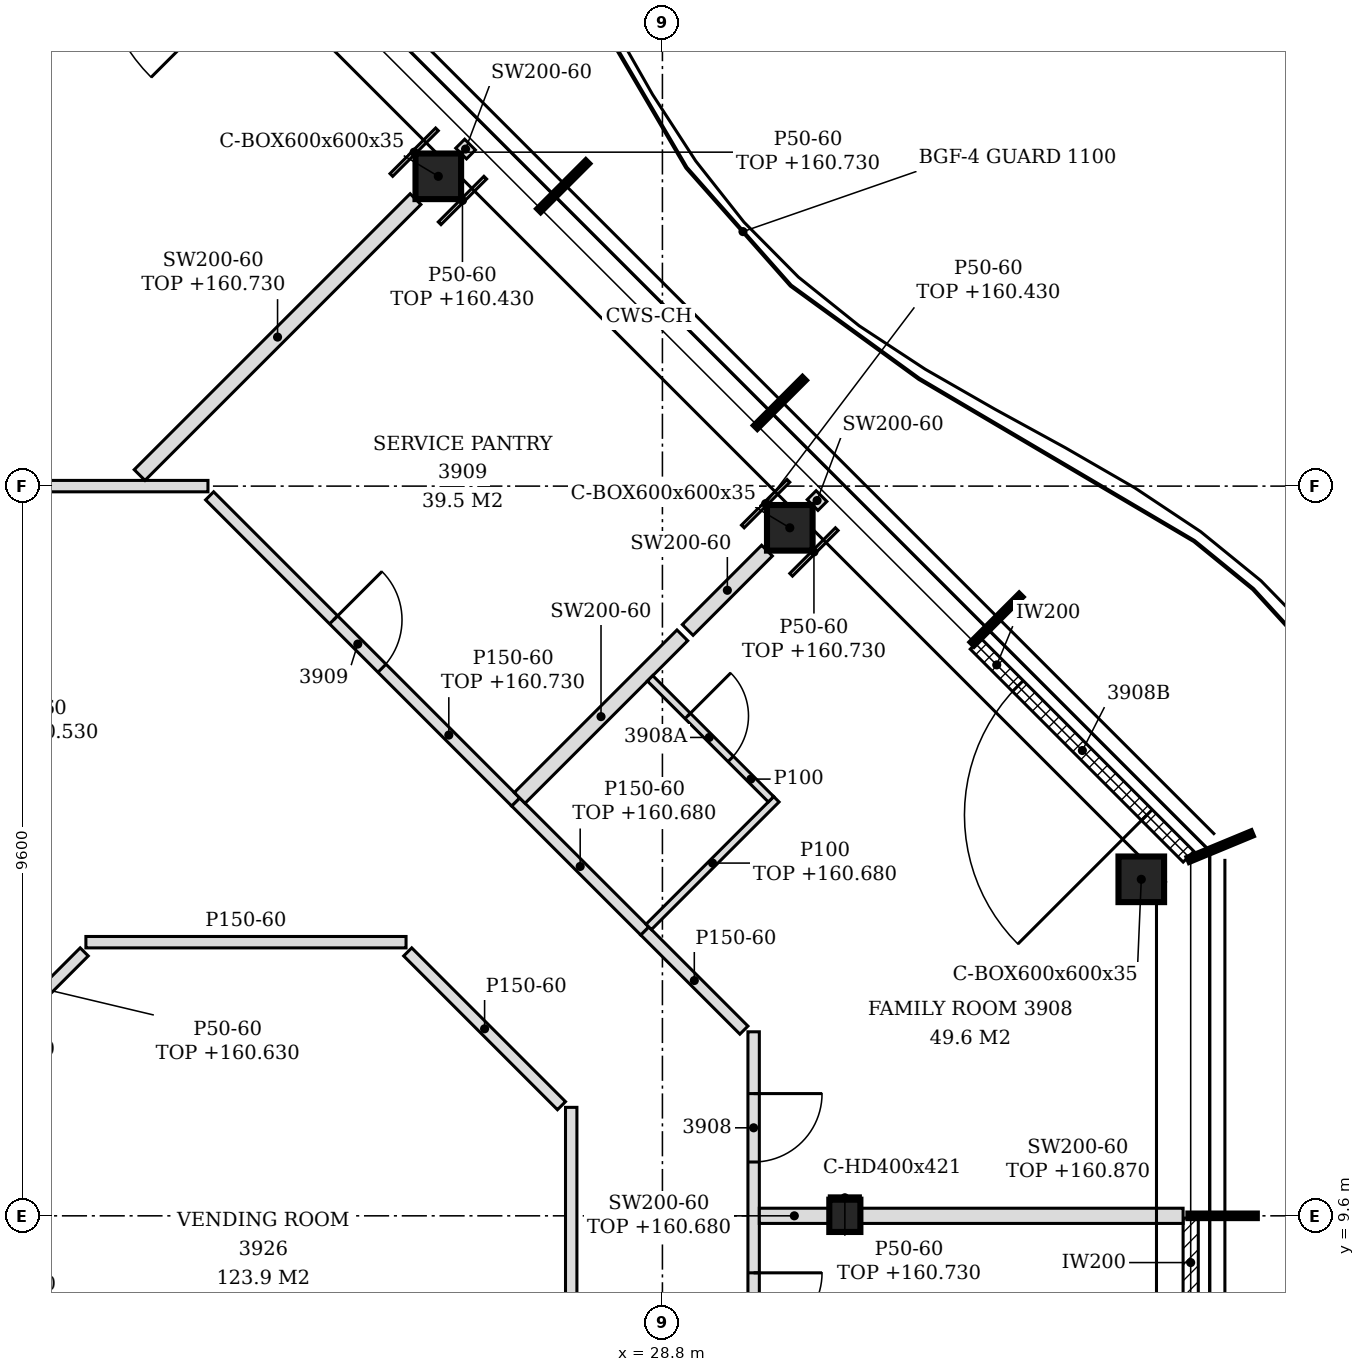
"""IFC4 building model, lengths in metres.
Left out: names, types, materials, properties, quantities, classifications, styles, units other than length and angle.
Written with IfcOpenShell. Run it as: python <this file> out.ifc"""

import sys

from ifc_helpers import new_model, si_unit, direction, frame, frame_2d, origin, origin_2d, place, context, subcontext, project, spatial, polyline, rectangle, hollow_rectangle, i_section, outline, extrude, element, fill, save


model = new_model("IFC4")
c1 = context("Model", 3, precision=1e-05, world=origin(), true_north=direction((0.0, 1.0)))
c2 = subcontext(c1, "Body", "Model", "MODEL_VIEW")
j1 = project(units=[si_unit("LENGTHUNIT", "METRE"), si_unit("PLANEANGLEUNIT", "RADIAN")], contexts=[c1])
p1 = place(None, origin())
s1 = spatial("IfcSite", under=j1, at=p1, CompositionType="ELEMENT")
p2 = place(p1, origin())
s2 = spatial("IfcBuilding", under=s1, at=p2, CompositionType="ELEMENT")
p3 = place(p2, frame((0.0, 0.0, 157.8)))
s3 = spatial("IfcBuildingStorey", under=s2, at=p3, CompositionType="ELEMENT", Elevation=157.8)
for number, where, z_axis, x_axis in (
    (1, (35.1, 14.027, -0.15), (0.0, 0.0, 1.0), (1.0, 0.0, 0.0)),
    (2, (30.476, 18.652, -0.15), (0.0, 0.0, 1.0), (1.0, 0.0, 0.0)),
    (3, (25.852, 23.276, -0.15), (0.0, 0.0, 1.0), (1.0, 0.0, 0.0)),
):
    element("IfcColumn", number, at=place(p3, frame(where, z_axis=z_axis, x_axis=x_axis)), inside=s3, PredefinedType="COLUMN", context=c2, shape_type="SweptSolid", body=[
        extrude(hollow_rectangle(XDim=0.6, YDim=0.6, WallThickness=0.035, at=origin_2d()), origin(), (0.0, 0.0, 1.0), 3.6),
    ])
p4 = place(p3, frame((31.2, 9.6, -0.15), z_axis=(0.0, 0.0, 1.0), x_axis=(1.0, 0.0, 0.0)))
e4 = element("IfcColumn", 4, at=p4, inside=s3, PredefinedType="COLUMN", context=c2, shape_type="SweptSolid", body=[
    extrude(i_section(OverallWidth=0.409, OverallDepth=0.425, WebThickness=0.033, FlangeThickness=0.052, FilletRadius=0.015, at=origin_2d()), origin(), (0.0, 0.0, 1.0), 3.6),
])
p5 = place(p3, frame((35.75, 4.83, 0.0), z_axis=(0.0, 0.0, 1.0), x_axis=(0.0, 1.0, 0.0)))
e5 = element("IfcWall", 5, at=p5, inside=s3, PredefinedType="NOTDEFINED", context=c2, shape_type="SweptSolid", body=[
    extrude(rectangle(XDim=4.74, YDim=0.2, at=frame_2d((2.37, 0.0))), origin(), (0.0, 0.0, 1.0), 3.45),
])
p6 = place(p5, frame((1.17, 0.0, 0.0)))
e6 = element("IfcOpeningElement", 6, at=p6, cuts=e5, PredefinedType="OPENING", context=c2, shape_type="SweptSolid", body=[
    extrude(rectangle(XDim=2.4, YDim=2.4, at=frame_2d((1.2, 1.2))), frame((0.0, 0.11, 0.0), z_axis=(0.0, -1.0, 0.0), x_axis=(1.0, 0.0, 0.0)), (0.0, 0.0, 1.0), 0.22),
])
p7 = place(p3, frame((35.722, 14.325, 0.0), z_axis=(0.0, 0.0, 1.0), x_axis=(-0.707106781187, 0.707106781187, 0.0)))
e7 = element("IfcWall", 7, at=p7, inside=s3, PredefinedType="NOTDEFINED", context=c2, shape_type="SweptSolid", body=[
    extrude(rectangle(XDim=3.962, YDim=0.2, at=frame_2d((1.981, 0.0))), origin(), (0.0, 0.0, 1.0), 3.45),
])
p8 = place(p7, frame((0.775, 0.0, 0.0)))
e8 = element("IfcOpeningElement", 8, at=p8, cuts=e7, PredefinedType="OPENING", context=c2, shape_type="SweptSolid", body=[
    extrude(rectangle(XDim=2.4, YDim=2.4, at=frame_2d((1.2, 1.2))), frame((0.0, 0.11, 0.0), z_axis=(0.0, -1.0, 0.0), x_axis=(1.0, 0.0, 0.0)), (0.0, 0.0, 1.0), 0.22),
])
p9 = place(p3, frame((30.0, -0.813, 0.0), z_axis=(0.0, 0.0, 1.0), x_axis=(0.0, 1.0, 0.0)))
e9 = element("IfcWall", 9, at=p9, inside=s3, PredefinedType="PARTITIONING", context=c2, shape_type="SweptSolid", body=[
    extrude(outline(polyline([(0.0, 0.0), (12.834, 0.0), (12.834, 3.45), (10.518, 3.45), (10.516, 2.88), (10.308, 2.88), (10.306, 3.45), (5.718, 3.45), (5.716, 2.88), (5.508, 2.88), (5.506, 3.45), (0.918, 3.45), (0.916, 2.88), (0.708, 2.88), (0.706, 3.45), (0.0, 3.45), (0.0, 0.0)])), frame((0.0, 0.075, 0.0), z_axis=(0.0, -1.0, 0.0), x_axis=(1.0, 0.0, 0.0)), (0.0, 0.0, 1.0), 0.15),
])
p10 = place(p9, frame((1.563, 0.0, 0.0)))
e10 = element("IfcOpeningElement", 10, at=p10, cuts=e9, PredefinedType="OPENING", context=c2, shape_type="SweptSolid", body=[
    extrude(rectangle(XDim=0.9, YDim=2.1, at=frame_2d((0.45, 1.05))), frame((0.0, 0.085, 0.0), z_axis=(0.0, -1.0, 0.0), x_axis=(1.0, 0.0, 0.0)), (0.0, 0.0, 1.0), 0.17),
])
p11 = place(p9, frame((8.763, 0.0, 0.0)))
e11 = element("IfcOpeningElement", 11, at=p11, cuts=e9, PredefinedType="OPENING", context=c2, shape_type="SweptSolid", body=[
    extrude(rectangle(XDim=0.9, YDim=2.1, at=frame_2d((0.45, 1.05))), frame((0.0, 0.085, 0.0), z_axis=(0.0, -1.0, 0.0), x_axis=(1.0, 0.0, 0.0)), (0.0, 0.0, 1.0), 0.17),
])
p12 = place(p9, frame((11.121, 0.0, 0.0)))
e12 = element("IfcOpeningElement", 12, at=p12, cuts=e9, PredefinedType="OPENING", context=c2, shape_type="SweptSolid", body=[
    extrude(rectangle(XDim=0.9, YDim=2.1, at=frame_2d((0.45, 1.05))), frame((0.0, 0.085, 0.0), z_axis=(0.0, -1.0, 0.0), x_axis=(1.0, 0.0, 0.0)), (0.0, 0.0, 1.0), 0.17),
])
p13 = place(p3, frame((27.6, 0.1, 0.0), z_axis=(0.0, 0.0, 1.0), x_axis=(0.0, 1.0, 0.0)))
e13 = element("IfcWall", 13, at=p13, inside=s3, PredefinedType="PARTITIONING", context=c2, shape_type="SweptSolid", body=[
    extrude(outline(polyline([(0.0, 0.0), (10.927, 0.0), (10.927, 3.45), (9.605, 3.45), (9.603, 2.88), (9.395, 2.88), (9.393, 3.45), (4.805, 3.45), (4.803, 2.88), (4.595, 2.88), (4.593, 3.45), (0.005, 3.45), (0.003, 2.88), (0.0, 2.88), (0.0, 0.0)])), frame((0.0, 0.075, 0.0), z_axis=(0.0, -1.0, 0.0), x_axis=(1.0, 0.0, 0.0)), (0.0, 0.0, 1.0), 0.15),
])
p14 = place(p13, frame((1.0, 0.0, 0.0)))
e14 = element("IfcOpeningElement", 14, at=p14, cuts=e13, PredefinedType="OPENING", context=c2, shape_type="SweptSolid", body=[
    extrude(rectangle(XDim=0.8, YDim=2.1, at=frame_2d((0.4, 1.05))), frame((0.0, 0.085, 0.0), z_axis=(0.0, -1.0, 0.0), x_axis=(1.0, 0.0, 0.0)), (0.0, 0.0, 1.0), 0.17),
])
p15 = place(p13, frame((3.55, 0.0, 0.0)))
e15 = element("IfcOpeningElement", 15, at=p15, cuts=e13, PredefinedType="OPENING", context=c2, shape_type="SweptSolid", body=[
    extrude(rectangle(XDim=0.8, YDim=2.1, at=frame_2d((0.4, 1.05))), frame((0.0, 0.085, 0.0), z_axis=(0.0, -1.0, 0.0), x_axis=(1.0, 0.0, 0.0)), (0.0, 0.0, 1.0), 0.17),
])
p16 = place(p3, frame((30.075, 9.6, 0.0), z_axis=(0.0, 0.0, 1.0), x_axis=(1.0, 0.0, 0.0)))
e16 = element("IfcWall", 16, at=p16, inside=s3, PredefinedType="PARTITIONING", context=c2, shape_type="SweptSolid", body=[
    extrude(rectangle(XDim=0.921, YDim=0.2, at=frame_2d((0.46, 0.0))), origin(), (0.0, 0.0, 1.0), 2.88),
])
p17 = place(p3, frame((31.405, 9.6, 0.0), z_axis=(0.0, 0.0, 1.0), x_axis=(1.0, 0.0, 0.0)))
e17 = element("IfcWall", 17, at=p17, inside=s3, PredefinedType="PARTITIONING", context=c2, shape_type="SweptSolid", body=[
    extrude(outline(polyline([(0.0, 0.0), (4.245, 0.0), (4.246, 3.07), (3.845, 3.07), (3.844, 2.93), (3.545, 2.93), (3.543, 3.07), (0.0, 3.07), (0.0, 0.0)])), frame((0.0, 0.1, 0.0), z_axis=(0.0, -1.0, 0.0), x_axis=(1.0, 0.0, 0.0)), (0.0, 0.0, 1.0), 0.2),
])
p18 = place(p3, frame((27.472, 11.049, 0.0), z_axis=(0.0, 0.0, 1.0), x_axis=(-0.707106781187, 0.707106781187, 0.0)))
e18 = element("IfcWall", 18, at=p18, inside=s3, PredefinedType="PARTITIONING", context=c2, shape_type="SweptSolid", body=[
    extrude(rectangle(XDim=2.861, YDim=0.15, at=frame_2d((1.43, 0.0))), origin(), (0.0, 0.0, 1.0), 3.45),
])
p19 = place(p3, frame((29.872, 12.043, 0.0), z_axis=(0.0, 0.0, 1.0), x_axis=(-0.707172918471, 0.707040637716, 0.0)))
e19 = element("IfcWall", 19, at=p19, inside=s3, PredefinedType="PARTITIONING", context=c2, shape_type="SweptSolid", body=[
    extrude(rectangle(XDim=1.846, YDim=0.15, at=frame_2d((0.923, 0.0))), origin(), (0.0, 0.0, 1.0), 3.45),
])
p20 = place(p3, frame((20.208, 12.086, 0.0), z_axis=(0.0, 0.0, 1.0), x_axis=(0.706756381459, 0.707457007363, 0.0)))
e20 = element("IfcWall", 20, at=p20, inside=s3, PredefinedType="PARTITIONING", context=c2, shape_type="SweptSolid", body=[
    extrude(rectangle(XDim=1.394, YDim=0.15, at=frame_2d((0.697, 0.0))), origin(), (0.0, 0.0, 1.0), 3.45),
])
p21 = place(p3, frame((21.215, 13.2, 0.0), z_axis=(0.0, 0.0, 1.0), x_axis=(1.0, 0.0, 0.0)))
e21 = element("IfcWall", 21, at=p21, inside=s3, PredefinedType="PARTITIONING", context=c2, shape_type="SweptSolid", body=[
    extrude(rectangle(XDim=4.212, YDim=0.15, at=frame_2d((2.106, 0.0))), origin(), (0.0, 0.0, 1.0), 3.45),
])
p22 = place(p3, frame((28.567, 13.348, 0.0), z_axis=(0.0, 0.0, 1.0), x_axis=(-0.707310148094, 0.706903355773, 0.0)))
e22 = element("IfcWall", 22, at=p22, inside=s3, PredefinedType="PARTITIONING", context=c2, shape_type="SweptSolid", body=[
    extrude(rectangle(XDim=2.401, YDim=0.15, at=frame_2d((1.2, 0.0))), origin(), (0.0, 0.0, 1.0), 2.88),
])
p23 = place(p3, frame((28.62, 13.401, 0.0), z_axis=(0.0, 0.0, 1.0), x_axis=(0.707055379538, 0.707158179099, 0.0)))
e23 = element("IfcWall", 23, at=p23, inside=s3, PredefinedType="PARTITIONING", context=c2, shape_type="SweptSolid", body=[
    extrude(rectangle(XDim=2.375, YDim=0.1, at=frame_2d((1.188, 0.0))), origin(), (0.0, 0.0, 1.0), 2.88),
])
p24 = place(p3, frame((26.869, 15.045, 0.0), z_axis=(0.0, 0.0, 1.0), x_axis=(-0.706999586952, 0.707213959174, 0.0)))
e24 = element("IfcWall", 24, at=p24, inside=s3, PredefinedType="PARTITIONING", context=c2, shape_type="SweptSolid", body=[
    extrude(rectangle(XDim=5.694, YDim=0.15, at=frame_2d((2.847, 0.0))), origin(), (0.0, 0.0, 1.0), 2.93),
])
p25 = place(p24, frame((2.487, 0.0, 0.0)))
e25 = element("IfcOpeningElement", 25, at=p25, cuts=e24, PredefinedType="OPENING", context=c2, shape_type="SweptSolid", body=[
    extrude(rectangle(XDim=0.9, YDim=2.1, at=frame_2d((0.45, 1.05))), frame((0.0, 0.085, 0.0), z_axis=(0.0, -1.0, 0.0), x_axis=(1.0, 0.0, 0.0)), (0.0, 0.0, 1.0), 0.17),
])
p26 = place(p3, frame((26.922, 15.098, 0.0), z_axis=(0.0, 0.0, 1.0), x_axis=(0.707268147401, 0.706945378138, 0.0)))
e26 = element("IfcWall", 26, at=p26, inside=s3, PredefinedType="PARTITIONING", context=c2, shape_type="SweptSolid", body=[
    extrude(rectangle(XDim=3.026, YDim=0.2, at=frame_2d((1.513, 0.0))), origin(), (0.0, 0.0, 1.0), 3.45),
])
p27 = place(p3, frame((30.229, 15.08, 0.0), z_axis=(0.0, 0.0, 1.0), x_axis=(-0.707052524, 0.70716103421, 0.0)))
e27 = element("IfcWall", 27, at=p27, inside=s3, PredefinedType="PARTITIONING", context=c2, shape_type="SweptSolid", body=[
    extrude(rectangle(XDim=2.25, YDim=0.1, at=frame_2d((1.125, 0.0))), origin(), (0.0, 0.0, 1.0), 3.45),
])
p28 = place(p27, frame((0.75, 0.0, 0.0)))
e28 = element("IfcOpeningElement", 28, at=p28, cuts=e27, PredefinedType="OPENING", context=c2, shape_type="SweptSolid", body=[
    extrude(rectangle(XDim=0.8, YDim=2.1, at=frame_2d((0.4, 1.05))), frame((0.0, 0.06, 0.0), z_axis=(0.0, -1.0, 0.0), x_axis=(1.0, 0.0, 0.0)), (0.0, 0.0, 1.0), 0.12),
])
p29 = place(p3, frame((29.133, 17.308, 0.0), z_axis=(0.0, 0.0, 1.0), x_axis=(0.707024044771, 0.707189507922, 0.0)))
e29 = element("IfcWall", 29, at=p29, inside=s3, PredefinedType="PARTITIONING", context=c2, shape_type="SweptSolid", body=[
    extrude(rectangle(XDim=1.476, YDim=0.2, at=frame_2d((0.738, 0.0))), origin(), (0.0, 0.0, 1.0), 3.45),
])
p30 = place(p3, frame((30.776, 18.951, 0.0), z_axis=(0.0, 0.0, 1.0), x_axis=(0.706370595651, 0.707842201059, 0.0)))
e30 = element("IfcWall", 30, at=p30, inside=s3, PredefinedType="PARTITIONING", context=c2, shape_type="SweptSolid", body=[
    extrude(rectangle(XDim=0.166, YDim=0.2, at=frame_2d((0.083, 0.0))), origin(), (0.0, 0.0, 1.0), 3.45),
])
p31 = place(p3, frame((-8.421, 19.2, 0.0), z_axis=(0.0, 0.0, 1.0), x_axis=(1.0, 0.0, 0.0)))
e31 = element("IfcWall", 31, at=p31, inside=s3, PredefinedType="PARTITIONING", context=c2, shape_type="SweptSolid", body=[
    extrude(outline(polyline([(0.0, 0.0), (31.242, 0.0), (31.242, 2.88), (27.771, 2.88), (27.769, 2.73), (27.471, 2.73), (27.469, 2.88), (15.771, 2.88), (15.769, 2.73), (15.471, 2.73), (15.469, 2.88), (3.771, 2.88), (3.769, 2.73), (3.471, 2.73), (3.469, 2.88), (0.0, 2.88), (0.0, 0.0)])), frame((0.0, 0.075, 0.0), z_axis=(0.0, -1.0, 0.0), x_axis=(1.0, 0.0, 0.0)), (0.0, 0.0, 1.0), 0.15),
])
p32 = place(p31, frame((25.997, 0.0, 0.0)))
e32 = element("IfcOpeningElement", 32, at=p32, cuts=e31, PredefinedType="OPENING", context=c2, shape_type="SweptSolid", body=[
    extrude(rectangle(XDim=0.9, YDim=2.1, at=frame_2d((0.45, 1.05))), frame((0.0, 0.085, 0.0), z_axis=(0.0, -1.0, 0.0), x_axis=(1.0, 0.0, 0.0)), (0.0, 0.0, 1.0), 0.17),
])
p33 = place(p31, frame((17.93, 0.0, 0.0)))
e33 = element("IfcOpeningElement", 33, at=p33, cuts=e31, PredefinedType="OPENING", context=c2, shape_type="SweptSolid", body=[
    extrude(rectangle(XDim=0.9, YDim=2.1, at=frame_2d((0.45, 1.05))), frame((0.0, 0.085, 0.0), z_axis=(0.0, -1.0, 0.0), x_axis=(1.0, 0.0, 0.0)), (0.0, 0.0, 1.0), 0.17),
])
p34 = place(p31, frame((14.754, 0.0, 0.0)))
e34 = element("IfcOpeningElement", 34, at=p34, cuts=e31, PredefinedType="OPENING", context=c2, shape_type="SweptSolid", body=[
    extrude(rectangle(XDim=0.9, YDim=2.1, at=frame_2d((0.45, 1.05))), frame((0.0, 0.085, 0.0), z_axis=(0.0, -1.0, 0.0), x_axis=(1.0, 0.0, 0.0)), (0.0, 0.0, 1.0), 0.17),
])
p35 = place(p31, frame((9.057, 0.0, 0.0)))
e35 = element("IfcOpeningElement", 35, at=p35, cuts=e31, PredefinedType="OPENING", context=c2, shape_type="SweptSolid", body=[
    extrude(rectangle(XDim=0.9, YDim=2.1, at=frame_2d((0.45, 1.05))), frame((0.0, 0.085, 0.0), z_axis=(0.0, -1.0, 0.0), x_axis=(1.0, 0.0, 0.0)), (0.0, 0.0, 1.0), 0.17),
])
p36 = place(p31, frame((2.907, 0.0, 0.0)))
e36 = element("IfcOpeningElement", 36, at=p36, cuts=e31, PredefinedType="OPENING", context=c2, shape_type="SweptSolid", body=[
    extrude(rectangle(XDim=0.9, YDim=2.1, at=frame_2d((0.45, 1.05))), frame((0.0, 0.085, 0.0), z_axis=(0.0, -1.0, 0.0), x_axis=(1.0, 0.0, 0.0)), (0.0, 0.0, 1.0), 0.17),
])
p37 = place(p3, frame((21.922, 19.346, 0.0), z_axis=(0.0, 0.0, 1.0), x_axis=(0.707106781187, 0.707106781187, 0.0)))
e37 = element("IfcWall", 37, at=p37, inside=s3, PredefinedType="PARTITIONING", context=c2, shape_type="SweptSolid", body=[
    extrude(rectangle(XDim=5.134, YDim=0.2, at=frame_2d((2.567, 0.0))), origin(), (0.0, 0.0, 1.0), 2.93),
])
p38 = place(p3, frame((26.152, 23.576, 0.0), z_axis=(0.0, 0.0, 1.0), x_axis=(0.707106781187, 0.707106781187, 0.0)))
e38 = element("IfcWall", 38, at=p38, inside=s3, PredefinedType="PARTITIONING", context=c2, shape_type="SweptSolid", body=[
    extrude(rectangle(XDim=0.166, YDim=0.2, at=frame_2d((0.083, 0.0))), origin(), (0.0, 0.0, 1.0), 3.45),
])
p39 = place(p3, frame((30.996, 9.837, 0.0), z_axis=(0.0, 0.0, 1.0), x_axis=(1.0, 0.0, 0.0)))
e39 = element("IfcWall", 39, at=p39, inside=s3, PredefinedType="PARTITIONING", context=c2, shape_type="SweptSolid", body=[
    extrude(rectangle(XDim=0.409, YDim=0.05, at=frame_2d((0.205, 0.0))), origin(), (0.0, 0.0, 1.0), 2.93),
])
p40 = place(p3, frame((29.858, 18.669, 0.0), z_axis=(0.0, 0.0, 1.0), x_axis=(0.707106781187, 0.707106781187, 0.0)))
e40 = element("IfcWall", 40, at=p40, inside=s3, PredefinedType="PARTITIONING", context=c2, shape_type="SweptSolid", body=[
    extrude(rectangle(XDim=0.849, YDim=0.05, at=frame_2d((0.424, 0.0))), origin(), (0.0, 0.0, 1.0), 2.63),
])
p41 = place(p3, frame((30.493, 18.034, 0.0), z_axis=(0.0, 0.0, 1.0), x_axis=(0.707106781187, 0.707106781187, 0.0)))
e41 = element("IfcWall", 41, at=p41, inside=s3, PredefinedType="PARTITIONING", context=c2, shape_type="SweptSolid", body=[
    extrude(rectangle(XDim=0.849, YDim=0.05, at=frame_2d((0.424, 0.0))), origin(), (0.0, 0.0, 1.0), 2.93),
])
p42 = place(p3, frame((25.234, 23.293, 0.0), z_axis=(0.0, 0.0, 1.0), x_axis=(0.707106781187, 0.707106781187, 0.0)))
e42 = element("IfcWall", 42, at=p42, inside=s3, PredefinedType="PARTITIONING", context=c2, shape_type="SweptSolid", body=[
    extrude(rectangle(XDim=0.848, YDim=0.05, at=frame_2d((0.424, 0.0))), origin(), (0.0, 0.0, 1.0), 2.93),
])
p43 = place(p3, frame((25.869, 22.658, 0.0), z_axis=(0.0, 0.0, 1.0), x_axis=(0.707106781187, 0.707106781187, 0.0)))
e43 = element("IfcWall", 43, at=p43, inside=s3, PredefinedType="PARTITIONING", context=c2, shape_type="SweptSolid", body=[
    extrude(rectangle(XDim=0.849, YDim=0.05, at=frame_2d((0.424, 0.0))), origin(), (0.0, 0.0, 1.0), 2.63),
])
p44 = place(p8, origin())
e44 = element("IfcDoor", 44, at=p44, inside=s3, OperationType="SINGLE_SWING_LEFT", PredefinedType="DOOR", context=c2, shape_type="SweptSolid", body=[
    extrude(rectangle(XDim=2.4, YDim=2.4, at=frame_2d((1.2, 1.2))), frame((0.0, 0.025, 0.0), z_axis=(0.0, -1.0, 0.0), x_axis=(1.0, 0.0, 0.0)), (0.0, 0.0, 1.0), 0.05),
])
fill(e8, e44)
p45 = place(p11, frame((0.9, 0.0, 0.0), z_axis=(0.0, 0.0, 1.0), x_axis=(-1.0, 0.0, 0.0)))
e45 = element("IfcDoor", 45, at=p45, inside=s3, OperationType="SINGLE_SWING_LEFT", PredefinedType="DOOR", context=c2, shape_type="SweptSolid", body=[
    extrude(rectangle(XDim=0.9, YDim=2.1, at=frame_2d((0.45, 1.05))), frame((0.0, 0.025, 0.0), z_axis=(0.0, -1.0, 0.0), x_axis=(1.0, 0.0, 0.0)), (0.0, 0.0, 1.0), 0.05),
])
fill(e11, e45)
p46 = place(p12, frame((0.9, 0.0, 0.0), z_axis=(0.0, 0.0, 1.0), x_axis=(-1.0, 0.0, 0.0)))
e46 = element("IfcDoor", 46, at=p46, inside=s3, OperationType="SINGLE_SWING_LEFT", PredefinedType="DOOR", context=c2, shape_type="SweptSolid", body=[
    extrude(rectangle(XDim=0.9, YDim=2.1, at=frame_2d((0.45, 1.05))), frame((0.0, 0.025, 0.0), z_axis=(0.0, -1.0, 0.0), x_axis=(1.0, 0.0, 0.0)), (0.0, 0.0, 1.0), 0.05),
])
fill(e12, e46)
p47 = place(p28, frame((0.8, 0.0, 0.0), z_axis=(0.0, 0.0, 1.0), x_axis=(-1.0, 0.0, 0.0)))
e47 = element("IfcDoor", 47, at=p47, inside=s3, OperationType="SINGLE_SWING_LEFT", PredefinedType="DOOR", context=c2, shape_type="SweptSolid", body=[
    extrude(rectangle(XDim=0.8, YDim=2.1, at=frame_2d((0.4, 1.05))), frame((0.0, 0.025, 0.0), z_axis=(0.0, -1.0, 0.0), x_axis=(1.0, 0.0, 0.0)), (0.0, 0.0, 1.0), 0.05),
])
fill(e28, e47)
p48 = place(p25, frame((0.9, 0.0, 0.0), z_axis=(0.0, 0.0, 1.0), x_axis=(-1.0, 0.0, 0.0)))
e48 = element("IfcDoor", 48, at=p48, inside=s3, OperationType="SINGLE_SWING_LEFT", PredefinedType="DOOR", context=c2, shape_type="SweptSolid", body=[
    extrude(rectangle(XDim=0.9, YDim=2.1, at=frame_2d((0.45, 1.05))), frame((0.0, 0.025, 0.0), z_axis=(0.0, -1.0, 0.0), x_axis=(1.0, 0.0, 0.0)), (0.0, 0.0, 1.0), 0.05),
])
fill(e25, e48)
save(model, sys.argv[1])
